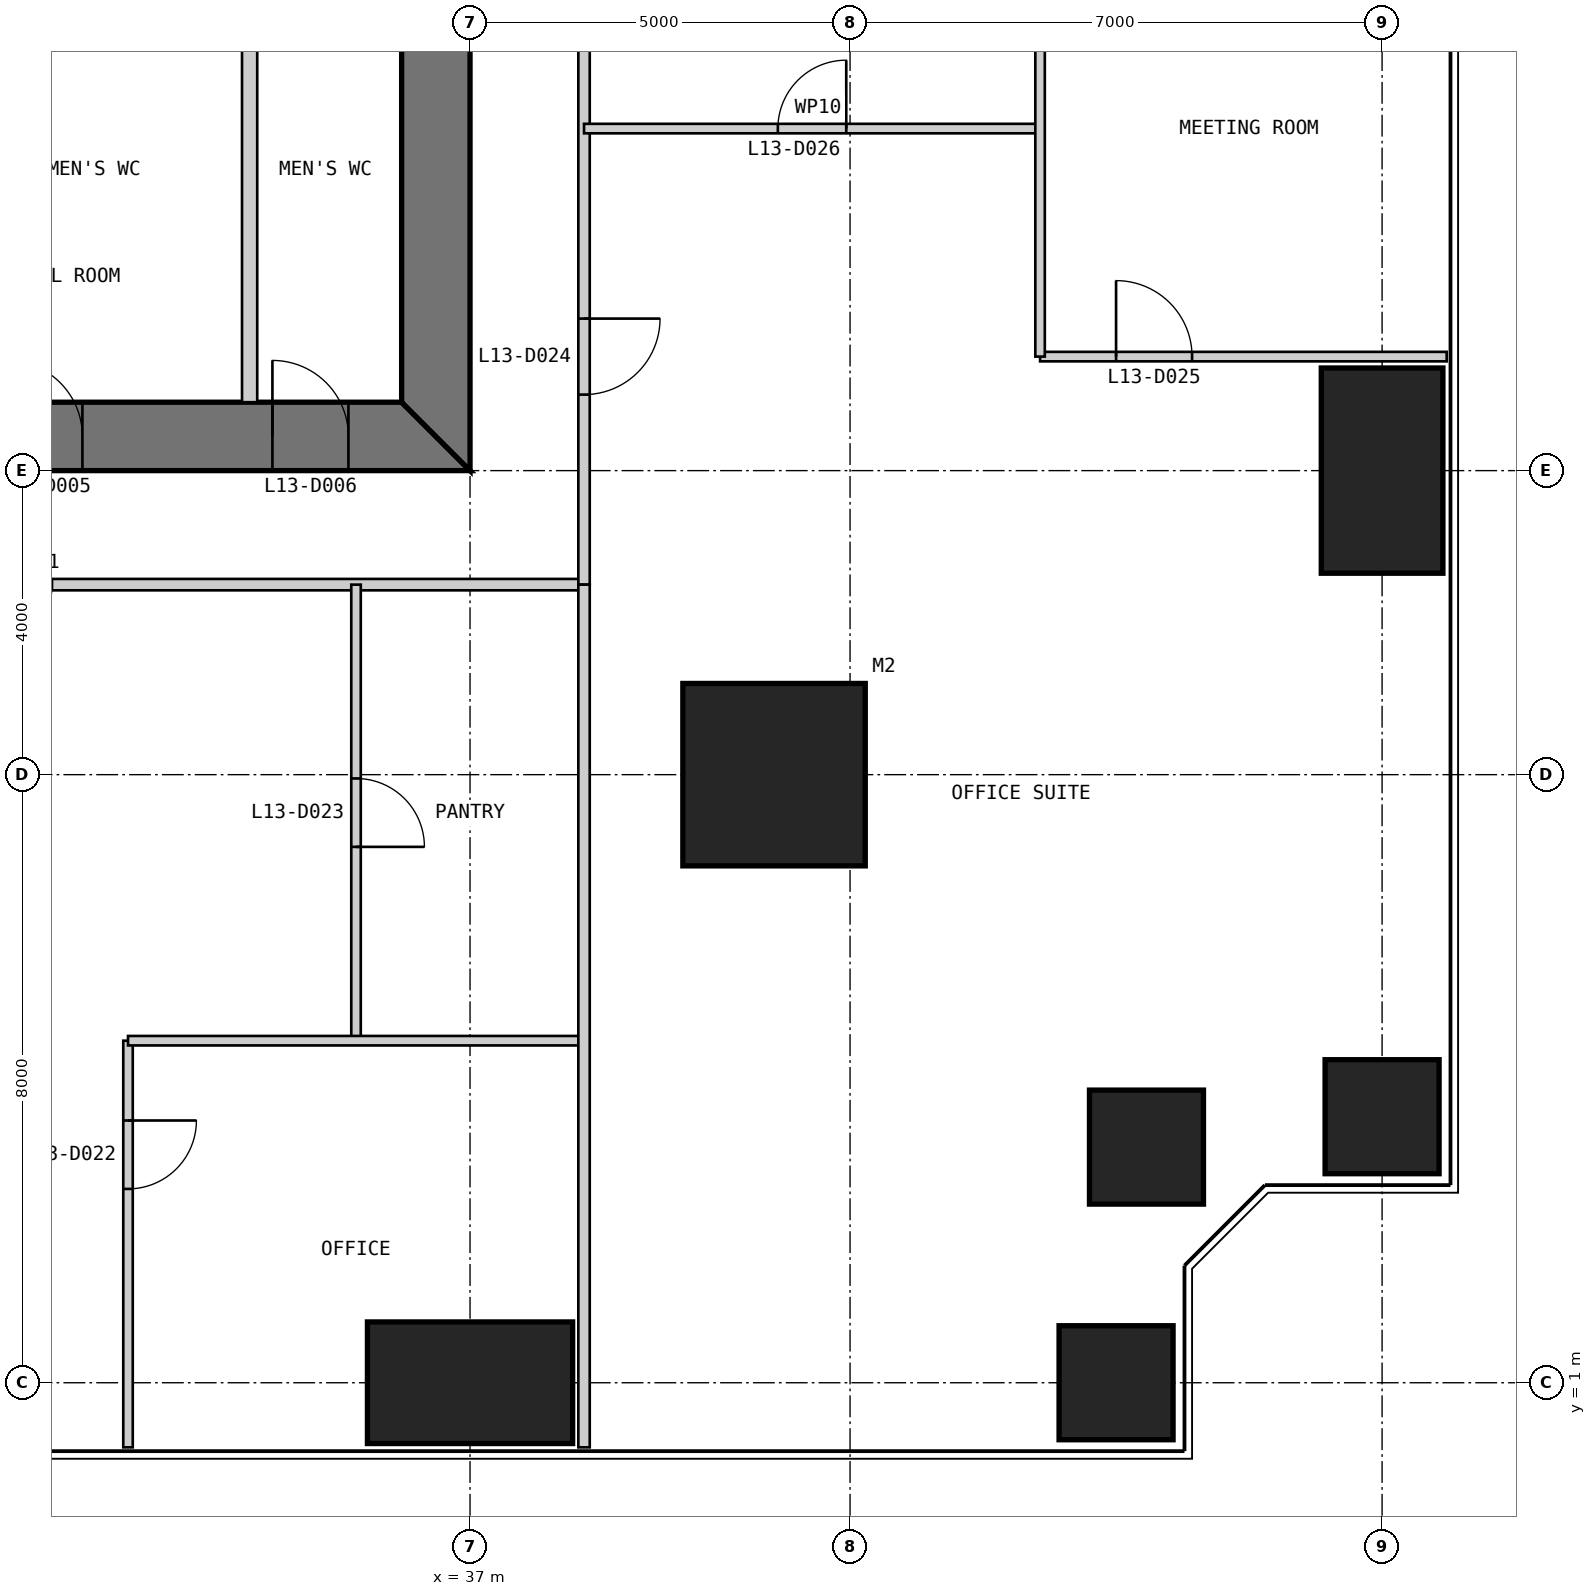
"""IFC4 building model, lengths in metres.
Left out: names, types, materials, properties, quantities, classifications, styles, units other than length and angle.
Written with IfcOpenShell. Run it as: python <this file> out.ifc"""

import sys

from ifc_helpers import new_model, si_unit, direction, frame, frame_2d, origin, origin_2d, place, context, subcontext, project, spatial, polyline, rectangle, outline, extrude, element, fill, save


model = new_model("IFC4")
c1 = context("Model", 3, precision=1e-05, world=origin(), true_north=direction((0.0, 1.0)))
c2 = subcontext(c1, "Body", "Model", "MODEL_VIEW")
j1 = project(units=[si_unit("LENGTHUNIT", "METRE"), si_unit("PLANEANGLEUNIT", "RADIAN")], contexts=[c1])
p1 = place(None, origin())
s1 = spatial("IfcSite", under=j1, at=p1, CompositionType="ELEMENT")
p2 = place(p1, origin())
s2 = spatial("IfcBuilding", under=s1, at=p2, CompositionType="ELEMENT")
p3 = place(p2, frame((0.0, 0.0, 59.0)))
s3 = spatial("IfcBuildingStorey", under=s2, at=p3, CompositionType="ELEMENT", Elevation=59.0)
p4 = place(p3, frame((41.0, 9.0, 0.0), z_axis=(0.0, 0.0, 1.0), x_axis=(1.0, 0.0, 0.0)))
e1 = element("IfcColumn", 1, at=p4, inside=s3, PredefinedType="COLUMN", context=c2, shape_type="SweptSolid", body=[
    extrude(rectangle(XDim=2.4, YDim=2.4, at=origin_2d()), origin(), (0.0, 0.0, 1.0), 4.0),
])
p5 = place(p3, frame((37.0, 1.0, 0.0), z_axis=(0.0, 0.0, 1.0), x_axis=(1.0, 0.0, 0.0)))
e2 = element("IfcColumn", 2, at=p5, inside=s3, PredefinedType="COLUMN", context=c2, shape_type="SweptSolid", body=[
    extrude(rectangle(XDim=2.7, YDim=1.6, at=origin_2d()), origin(), (0.0, 0.0, 1.0), 4.0),
])
for number, where, z_axis, x_axis in (
    (3, (45.5, 1.0, 0.0), (0.0, 0.0, 1.0), (1.0, 0.0, 0.0)),
    (4, (45.9, 4.1, 0.0), (0.0, 0.0, 1.0), (1.0, 0.0, 0.0)),
    (5, (49.0, 4.5, 0.0), (0.0, 0.0, 1.0), (1.0, 0.0, 0.0)),
):
    element("IfcColumn", number, at=place(p3, frame(where, z_axis=z_axis, x_axis=x_axis)), inside=s3, PredefinedType="COLUMN", context=c2, shape_type="SweptSolid", body=[
        extrude(rectangle(XDim=1.5, YDim=1.5, at=origin_2d()), origin(), (0.0, 0.0, 1.0), 4.0),
    ])
p6 = place(p3, frame((49.0, 13.0, 0.0), z_axis=(0.0, 0.0, 1.0), x_axis=(1.0, 0.0, 0.0)))
e6 = element("IfcColumn", 6, at=p6, inside=s3, PredefinedType="COLUMN", context=c2, shape_type="SweptSolid", body=[
    extrude(rectangle(XDim=1.6, YDim=2.7, at=origin_2d()), origin(), (0.0, 0.0, 1.0), 4.0),
])
p7 = place(p3, frame((13.0, 13.45, 0.0), z_axis=(0.0, 0.0, 1.0), x_axis=(1.0, 0.0, 0.0)))
e7 = element("IfcWall", 7, at=p7, inside=s3, PredefinedType="SHEAR", context=c2, shape_type="SweptSolid", body=[
    extrude(outline(polyline([(0.0, -0.45), (24.0, -0.45), (23.1, 0.45), (0.9, 0.45), (0.0, -0.45)])), origin(), (0.0, 0.0, 1.0), 4.0),
])
p8 = place(p7, frame((4.9, 0.0, 0.0)))
e8 = element("IfcOpeningElement", 8, at=p8, cuts=e7, PredefinedType="OPENING", context=c2, shape_type="SweptSolid", body=[
    extrude(rectangle(XDim=1.0, YDim=2.2, at=frame_2d((0.5, 1.1))), frame((0.0, 0.46, 0.0), z_axis=(0.0, -1.0, 0.0), x_axis=(1.0, 0.0, 0.0)), (0.0, 0.0, 1.0), 0.92),
])
p9 = place(p7, frame((8.9, 0.0, 0.0)))
e9 = element("IfcOpeningElement", 9, at=p9, cuts=e7, PredefinedType="OPENING", context=c2, shape_type="SweptSolid", body=[
    extrude(rectangle(XDim=1.1, YDim=2.2, at=frame_2d((0.55, 1.1))), frame((0.0, 0.46, 0.0), z_axis=(0.0, -1.0, 0.0), x_axis=(1.0, 0.0, 0.0)), (0.0, 0.0, 1.0), 0.92),
])
p10 = place(p7, frame((15.05, 0.0, 0.0)))
e10 = element("IfcOpeningElement", 10, at=p10, cuts=e7, PredefinedType="OPENING", context=c2, shape_type="SweptSolid", body=[
    extrude(rectangle(XDim=0.9, YDim=2.2, at=frame_2d((0.45, 1.1))), frame((0.0, 0.46, 0.0), z_axis=(0.0, -1.0, 0.0), x_axis=(1.0, 0.0, 0.0)), (0.0, 0.0, 1.0), 0.92),
])
p11 = place(p7, frame((17.9, 0.0, 0.0)))
e11 = element("IfcOpeningElement", 11, at=p11, cuts=e7, PredefinedType="OPENING", context=c2, shape_type="SweptSolid", body=[
    extrude(rectangle(XDim=1.0, YDim=2.2, at=frame_2d((0.5, 1.1))), frame((0.0, 0.46, 0.0), z_axis=(0.0, -1.0, 0.0), x_axis=(1.0, 0.0, 0.0)), (0.0, 0.0, 1.0), 0.92),
])
p12 = place(p7, frame((21.4, 0.0, 0.0)))
e12 = element("IfcOpeningElement", 12, at=p12, cuts=e7, PredefinedType="OPENING", context=c2, shape_type="SweptSolid", body=[
    extrude(rectangle(XDim=1.0, YDim=2.2, at=frame_2d((0.5, 1.1))), frame((0.0, 0.46, 0.0), z_axis=(0.0, -1.0, 0.0), x_axis=(1.0, 0.0, 0.0)), (0.0, 0.0, 1.0), 0.92),
])
p13 = place(p3, frame((36.55, 13.9, 0.0), z_axis=(0.0, 0.0, 1.0), x_axis=(0.0, 1.0, 0.0)))
e13 = element("IfcWall", 13, at=p13, inside=s3, PredefinedType="SHEAR", context=c2, shape_type="SweptSolid", body=[
    extrude(outline(polyline([(-0.9, -0.45), (23.1, -0.45), (22.2, 0.45), (0.0, 0.45), (-0.9, -0.45)])), origin(), (0.0, 0.0, 1.0), 4.0),
])
p14 = place(p13, frame((20.2, 0.0, 0.0)))
e14 = element("IfcOpeningElement", 14, at=p14, cuts=e13, PredefinedType="OPENING", context=c2, shape_type="SweptSolid", body=[
    extrude(rectangle(XDim=1.0, YDim=2.2, at=frame_2d((0.5, 1.1))), frame((0.0, 0.46, 0.0), z_axis=(0.0, -1.0, 0.0), x_axis=(1.0, 0.0, 0.0)), (0.0, 0.0, 1.0), 0.92),
])
p15 = place(p13, frame((17.25, 0.0, 0.0)))
e15 = element("IfcOpeningElement", 15, at=p15, cuts=e13, PredefinedType="OPENING", context=c2, shape_type="SweptSolid", body=[
    extrude(rectangle(XDim=0.9, YDim=2.2, at=frame_2d((0.45, 1.1))), frame((0.0, 0.46, 0.0), z_axis=(0.0, -1.0, 0.0), x_axis=(1.0, 0.0, 0.0)), (0.0, 0.0, 1.0), 0.92),
])
p16 = place(p3, frame((34.1, 13.9, 0.0), z_axis=(0.0, 0.0, 1.0), x_axis=(0.0, 1.0, 0.0)))
e16 = element("IfcWall", 16, at=p16, inside=s3, PredefinedType="PARTITIONING", context=c2, shape_type="SweptSolid", body=[
    extrude(rectangle(XDim=6.1, YDim=0.2, at=frame_2d((3.05, 0.0))), origin(), (0.0, 0.0, 1.0), 3.8),
])
p17 = place(p3, frame((11.5, 11.5, 0.0), z_axis=(0.0, 0.0, 1.0), x_axis=(1.0, 0.0, 0.0)))
e17 = element("IfcWall", 17, at=p17, inside=s3, PredefinedType="PARTITIONING", context=c2, shape_type="SweptSolid", body=[
    extrude(rectangle(XDim=27.0, YDim=0.15, at=frame_2d((13.5, 0.0))), origin(), (0.0, 0.0, 1.0), 3.85),
])
p18 = place(p17, frame((1.0, 0.0, 0.0)))
e18 = element("IfcOpeningElement", 18, at=p18, cuts=e17, PredefinedType="OPENING", context=c2, shape_type="SweptSolid", body=[
    extrude(rectangle(XDim=1.0, YDim=2.2, at=frame_2d((0.5, 1.1))), frame((0.0, 0.085, 0.0), z_axis=(0.0, -1.0, 0.0), x_axis=(1.0, 0.0, 0.0)), (0.0, 0.0, 1.0), 0.17),
])
p19 = place(p17, frame((5.5, 0.0, 0.0)))
e19 = element("IfcOpeningElement", 19, at=p19, cuts=e17, PredefinedType="OPENING", context=c2, shape_type="SweptSolid", body=[
    extrude(rectangle(XDim=1.0, YDim=2.2, at=frame_2d((0.5, 1.1))), frame((0.0, 0.085, 0.0), z_axis=(0.0, -1.0, 0.0), x_axis=(1.0, 0.0, 0.0)), (0.0, 0.0, 1.0), 0.17),
])
p20 = place(p17, frame((11.5, 0.0, 0.0)))
e20 = element("IfcOpeningElement", 20, at=p20, cuts=e17, PredefinedType="OPENING", context=c2, shape_type="SweptSolid", body=[
    extrude(rectangle(XDim=1.0, YDim=2.2, at=frame_2d((0.5, 1.1))), frame((0.0, 0.085, 0.0), z_axis=(0.0, -1.0, 0.0), x_axis=(1.0, 0.0, 0.0)), (0.0, 0.0, 1.0), 0.17),
])
p21 = place(p17, frame((19.0, 0.0, 0.0)))
e21 = element("IfcOpeningElement", 21, at=p21, cuts=e17, PredefinedType="OPENING", context=c2, shape_type="SweptSolid", body=[
    extrude(rectangle(XDim=1.0, YDim=2.2, at=frame_2d((0.5, 1.1))), frame((0.0, 0.085, 0.0), z_axis=(0.0, -1.0, 0.0), x_axis=(1.0, 0.0, 0.0)), (0.0, 0.0, 1.0), 0.17),
])
p22 = place(p3, frame((32.5, 0.15, 0.0), z_axis=(0.0, 0.0, 1.0), x_axis=(0.0, 1.0, 0.0)))
e22 = element("IfcWall", 22, at=p22, inside=s3, PredefinedType="PARTITIONING", context=c2, shape_type="SweptSolid", body=[
    extrude(rectangle(XDim=5.35, YDim=0.125, at=frame_2d((2.675, 0.0))), origin(), (0.0, 0.0, 1.0), 3.85),
])
p23 = place(p22, frame((3.4, 0.0, 0.0)))
e23 = element("IfcOpeningElement", 23, at=p23, cuts=e22, PredefinedType="OPENING", context=c2, shape_type="SweptSolid", body=[
    extrude(rectangle(XDim=0.9, YDim=2.2, at=frame_2d((0.45, 1.1))), frame((0.0, 0.073, 0.0), z_axis=(0.0, -1.0, 0.0), x_axis=(1.0, 0.0, 0.0)), (0.0, 0.0, 1.0), 0.145),
])
p24 = place(p3, frame((35.5, 5.5, 0.0), z_axis=(0.0, 0.0, 1.0), x_axis=(0.0, 1.0, 0.0)))
e24 = element("IfcWall", 24, at=p24, inside=s3, PredefinedType="PARTITIONING", context=c2, shape_type="SweptSolid", body=[
    extrude(rectangle(XDim=6.0, YDim=0.125, at=frame_2d((3.0, 0.0))), origin(), (0.0, 0.0, 1.0), 3.85),
])
p25 = place(p24, frame((2.55, 0.0, 0.0)))
e25 = element("IfcOpeningElement", 25, at=p25, cuts=e24, PredefinedType="OPENING", context=c2, shape_type="SweptSolid", body=[
    extrude(rectangle(XDim=0.9, YDim=2.2, at=frame_2d((0.45, 1.1))), frame((0.0, 0.073, 0.0), z_axis=(0.0, -1.0, 0.0), x_axis=(1.0, 0.0, 0.0)), (0.0, 0.0, 1.0), 0.145),
])
p26 = place(p3, frame((32.5, 5.5, 0.0), z_axis=(0.0, 0.0, 1.0), x_axis=(1.0, 0.0, 0.0)))
e26 = element("IfcWall", 26, at=p26, inside=s3, PredefinedType="PARTITIONING", context=c2, shape_type="SweptSolid", body=[
    extrude(rectangle(XDim=6.0, YDim=0.125, at=frame_2d((3.0, 0.0))), origin(), (0.0, 0.0, 1.0), 3.85),
])
p27 = place(p3, frame((38.5, 11.5, 0.0), z_axis=(0.0, 0.0, 1.0), x_axis=(0.0, 1.0, 0.0)))
e27 = element("IfcWall", 27, at=p27, inside=s3, PredefinedType="PARTITIONING", context=c2, shape_type="SweptSolid", body=[
    extrude(rectangle(XDim=27.0, YDim=0.15, at=frame_2d((13.5, 0.0))), origin(), (0.0, 0.0, 1.0), 3.85),
])
p28 = place(p27, frame((2.5, 0.0, 0.0)))
e28 = element("IfcOpeningElement", 28, at=p28, cuts=e27, PredefinedType="OPENING", context=c2, shape_type="SweptSolid", body=[
    extrude(rectangle(XDim=1.0, YDim=2.2, at=frame_2d((0.5, 1.1))), frame((0.0, 0.085, 0.0), z_axis=(0.0, -1.0, 0.0), x_axis=(1.0, 0.0, 0.0)), (0.0, 0.0, 1.0), 0.17),
])
p29 = place(p27, frame((13.0, 0.0, 0.0)))
e29 = element("IfcOpeningElement", 29, at=p29, cuts=e27, PredefinedType="OPENING", context=c2, shape_type="SweptSolid", body=[
    extrude(rectangle(XDim=1.0, YDim=2.2, at=frame_2d((0.5, 1.1))), frame((0.0, 0.085, 0.0), z_axis=(0.0, -1.0, 0.0), x_axis=(1.0, 0.0, 0.0)), (0.0, 0.0, 1.0), 0.17),
])
p30 = place(p27, frame((23.5, 0.0, 0.0)))
e30 = element("IfcOpeningElement", 30, at=p30, cuts=e27, PredefinedType="OPENING", context=c2, shape_type="SweptSolid", body=[
    extrude(rectangle(XDim=1.0, YDim=2.2, at=frame_2d((0.5, 1.1))), frame((0.0, 0.085, 0.0), z_axis=(0.0, -1.0, 0.0), x_axis=(1.0, 0.0, 0.0)), (0.0, 0.0, 1.0), 0.17),
])
p31 = place(p3, frame((38.5, 0.15, 0.0), z_axis=(0.0, 0.0, 1.0), x_axis=(0.0, 1.0, 0.0)))
e31 = element("IfcWall", 31, at=p31, inside=s3, PredefinedType="PARTITIONING", context=c2, shape_type="SweptSolid", body=[
    extrude(rectangle(XDim=11.35, YDim=0.15, at=frame_2d((5.675, 0.0))), origin(), (0.0, 0.0, 1.0), 3.85),
])
p32 = place(p3, frame((49.85, 14.5, 0.0), z_axis=(0.0, 0.0, 1.0), x_axis=(-1.0, 0.0, 0.0)))
e32 = element("IfcWall", 32, at=p32, inside=s3, PredefinedType="PARTITIONING", context=c2, shape_type="SweptSolid", body=[
    extrude(rectangle(XDim=5.35, YDim=0.125, at=frame_2d((2.675, 0.0))), origin(), (0.0, 0.0, 1.0), 3.85),
])
p33 = place(p32, frame((3.35, 0.0, 0.0)))
e33 = element("IfcOpeningElement", 33, at=p33, cuts=e32, PredefinedType="OPENING", context=c2, shape_type="SweptSolid", body=[
    extrude(rectangle(XDim=1.0, YDim=2.2, at=frame_2d((0.5, 1.1))), frame((0.0, 0.073, 0.0), z_axis=(0.0, -1.0, 0.0), x_axis=(1.0, 0.0, 0.0)), (0.0, 0.0, 1.0), 0.145),
])
p34 = place(p3, frame((44.5, 17.5, 0.0), z_axis=(0.0, 0.0, 1.0), x_axis=(-1.0, 0.0, 0.0)))
e34 = element("IfcWall", 34, at=p34, inside=s3, PredefinedType="PARTITIONING", context=c2, shape_type="SweptSolid", body=[
    extrude(rectangle(XDim=6.0, YDim=0.125, at=frame_2d((3.0, 0.0))), origin(), (0.0, 0.0, 1.0), 3.85),
])
p35 = place(p34, frame((2.55, 0.0, 0.0)))
e35 = element("IfcOpeningElement", 35, at=p35, cuts=e34, PredefinedType="OPENING", context=c2, shape_type="SweptSolid", body=[
    extrude(rectangle(XDim=0.9, YDim=2.2, at=frame_2d((0.45, 1.1))), frame((0.0, 0.073, 0.0), z_axis=(0.0, -1.0, 0.0), x_axis=(1.0, 0.0, 0.0)), (0.0, 0.0, 1.0), 0.145),
])
p36 = place(p3, frame((44.5, 14.5, 0.0), z_axis=(0.0, 0.0, 1.0), x_axis=(0.0, 1.0, 0.0)))
e36 = element("IfcWall", 36, at=p36, inside=s3, PredefinedType="PARTITIONING", context=c2, shape_type="SweptSolid", body=[
    extrude(rectangle(XDim=6.0, YDim=0.125, at=frame_2d((3.0, 0.0))), origin(), (0.0, 0.0, 1.0), 3.85),
])
p37 = place(p11, origin())
e37 = element("IfcDoor", 37, at=p37, inside=s3, OperationType="SINGLE_SWING_LEFT", PredefinedType="DOOR", context=c2, shape_type="SweptSolid", body=[
    extrude(rectangle(XDim=1.0, YDim=2.2, at=frame_2d((0.5, 1.1))), frame((0.0, 0.025, 0.0), z_axis=(0.0, -1.0, 0.0), x_axis=(1.0, 0.0, 0.0)), (0.0, 0.0, 1.0), 0.05),
    extrude(outline(polyline([(0.0, 0.0), (0.04, 0.0), (0.04, 2.16), (0.96, 2.16), (0.96, 0.0), (1.0, 0.0), (1.0, 2.2), (0.0, 2.2), (0.0, 0.0)])), frame((0.0, 0.3, 0.0), z_axis=(0.0, -1.0, 0.0), x_axis=(1.0, 0.0, 0.0)), (0.0, 0.0, 1.0), 0.6),
])
fill(e11, e37)
p38 = place(p12, origin())
e38 = element("IfcDoor", 38, at=p38, inside=s3, OperationType="SINGLE_SWING_LEFT", PredefinedType="DOOR", context=c2, shape_type="SweptSolid", body=[
    extrude(rectangle(XDim=1.0, YDim=2.2, at=frame_2d((0.5, 1.1))), frame((0.0, 0.025, 0.0), z_axis=(0.0, -1.0, 0.0), x_axis=(1.0, 0.0, 0.0)), (0.0, 0.0, 1.0), 0.05),
    extrude(outline(polyline([(0.0, 0.0), (0.04, 0.0), (0.04, 2.16), (0.96, 2.16), (0.96, 0.0), (1.0, 0.0), (1.0, 2.2), (0.0, 2.2), (0.0, 0.0)])), frame((0.0, 0.3, 0.0), z_axis=(0.0, -1.0, 0.0), x_axis=(1.0, 0.0, 0.0)), (0.0, 0.0, 1.0), 0.6),
])
fill(e12, e38)
p39 = place(p23, frame((0.9, 0.0, 0.0), z_axis=(0.0, 0.0, 1.0), x_axis=(-1.0, 0.0, 0.0)))
e39 = element("IfcDoor", 39, at=p39, inside=s3, OperationType="SINGLE_SWING_LEFT", PredefinedType="DOOR", context=c2, shape_type="SweptSolid", body=[
    extrude(rectangle(XDim=0.9, YDim=2.2, at=frame_2d((0.45, 1.1))), frame((0.0, 0.025, 0.0), z_axis=(0.0, -1.0, 0.0), x_axis=(1.0, 0.0, 0.0)), (0.0, 0.0, 1.0), 0.05),
])
fill(e23, e39)
p40 = place(p25, frame((0.9, 0.0, 0.0), z_axis=(0.0, 0.0, 1.0), x_axis=(-1.0, 0.0, 0.0)))
e40 = element("IfcDoor", 40, at=p40, inside=s3, OperationType="SINGLE_SWING_RIGHT", PredefinedType="DOOR", context=c2, shape_type="SweptSolid", body=[
    extrude(rectangle(XDim=0.9, YDim=2.2, at=frame_2d((0.45, 1.1))), frame((0.0, 0.025, 0.0), z_axis=(0.0, -1.0, 0.0), x_axis=(1.0, 0.0, 0.0)), (0.0, 0.0, 1.0), 0.05),
])
fill(e25, e40)
p41 = place(p28, frame((1.0, 0.0, 0.0), z_axis=(0.0, 0.0, 1.0), x_axis=(-1.0, 0.0, 0.0)))
e41 = element("IfcDoor", 41, at=p41, inside=s3, OperationType="SINGLE_SWING_LEFT", PredefinedType="DOOR", context=c2, shape_type="SweptSolid", body=[
    extrude(rectangle(XDim=1.0, YDim=2.2, at=frame_2d((0.5, 1.1))), frame((0.0, 0.025, 0.0), z_axis=(0.0, -1.0, 0.0), x_axis=(1.0, 0.0, 0.0)), (0.0, 0.0, 1.0), 0.05),
])
fill(e28, e41)
p42 = place(p33, frame((1.0, 0.0, 0.0), z_axis=(0.0, 0.0, 1.0), x_axis=(-1.0, 0.0, 0.0)))
e42 = element("IfcDoor", 42, at=p42, inside=s3, OperationType="SINGLE_SWING_LEFT", PredefinedType="DOOR", context=c2, shape_type="SweptSolid", body=[
    extrude(rectangle(XDim=1.0, YDim=2.2, at=frame_2d((0.5, 1.1))), frame((0.0, 0.025, 0.0), z_axis=(0.0, -1.0, 0.0), x_axis=(1.0, 0.0, 0.0)), (0.0, 0.0, 1.0), 0.05),
])
fill(e33, e42)
p43 = place(p35, frame((0.9, 0.0, 0.0), z_axis=(0.0, 0.0, 1.0), x_axis=(-1.0, 0.0, 0.0)))
e43 = element("IfcDoor", 43, at=p43, inside=s3, OperationType="SINGLE_SWING_RIGHT", PredefinedType="DOOR", context=c2, shape_type="SweptSolid", body=[
    extrude(rectangle(XDim=0.9, YDim=2.2, at=frame_2d((0.45, 1.1))), frame((0.0, 0.025, 0.0), z_axis=(0.0, -1.0, 0.0), x_axis=(1.0, 0.0, 0.0)), (0.0, 0.0, 1.0), 0.05),
])
fill(e35, e43)
save(model, sys.argv[1])
